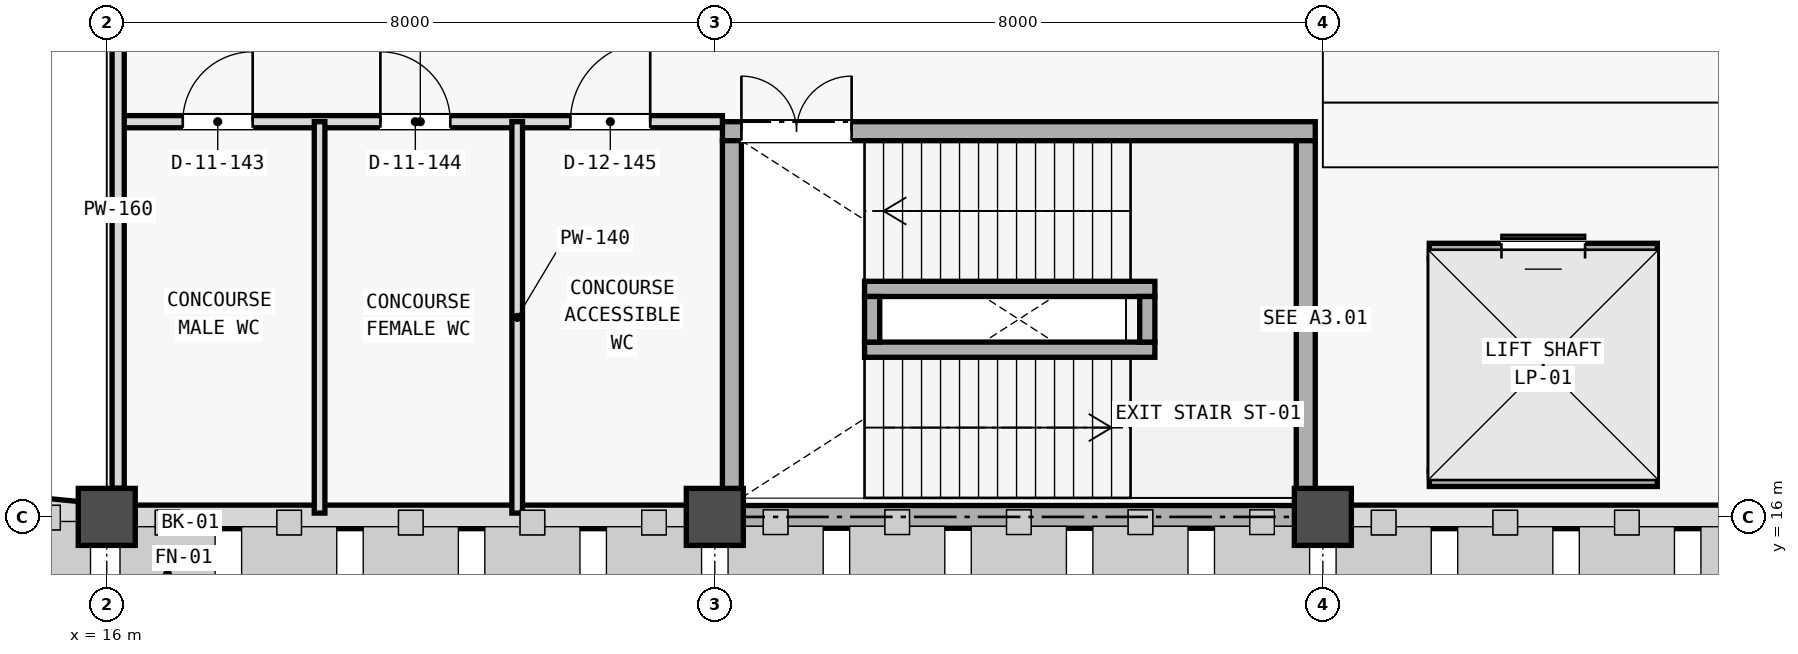
"""IFC4 building model, lengths in metres.
Left out: names, types, materials, properties, quantities, classifications, styles, units other than length and angle.
Written with IfcOpenShell. Run it as: python <this file> out.ifc"""

import sys

from ifc_helpers import new_model, si_unit, direction, frame, frame_2d, origin, origin_2d, place, context, subcontext, project, spatial, rectangle, extrude, element, fill, save


model = new_model("IFC4")
c1 = context("Model", 3, precision=1e-05, world=origin(), true_north=direction((0.0, 1.0)))
c2 = subcontext(c1, "Body", "Model", "MODEL_VIEW")
j1 = project(units=[si_unit("LENGTHUNIT", "METRE"), si_unit("PLANEANGLEUNIT", "RADIAN")], contexts=[c1])
p1 = place(None, origin())
s1 = spatial("IfcSite", under=j1, at=p1, CompositionType="ELEMENT")
p2 = place(p1, origin())
s2 = spatial("IfcBuilding", under=s1, at=p2, CompositionType="ELEMENT")
p3 = place(p2, frame((0.0, 0.0, 5.4)))
s3 = spatial("IfcBuildingStorey", under=s2, at=p3, CompositionType="ELEMENT", Elevation=5.4)
for number, where, z_axis, x_axis in (
    (1, (16.0, 16.0, 0.0), (0.0, 0.0, 1.0), (1.0, 0.0, 0.0)),
    (2, (24.0, 16.0, 0.0), (0.0, 0.0, 1.0), (1.0, 0.0, 0.0)),
    (3, (32.0, 16.0, 0.0), (0.0, 0.0, 1.0), (1.0, 0.0, 0.0)),
):
    element("IfcColumn", number, at=place(p3, frame(where, z_axis=z_axis, x_axis=x_axis)), inside=s3, PredefinedType="COLUMN", context=c2, shape_type="SweptSolid", body=[
        extrude(rectangle(XDim=0.75, YDim=0.75, at=origin_2d()), origin(), (0.0, 0.0, 1.0), 4.55),
    ])
p4 = place(p3, frame((16.371, 16.0, 0.0), z_axis=(0.0, 0.0, 1.0), x_axis=(1.0, 0.0, 0.0)))
e4 = element("IfcWall", 4, at=p4, inside=s3, PredefinedType="STANDARD", context=c2, shape_type="SweptSolid", body=[
    extrude(rectangle(XDim=7.258, YDim=0.31, at=frame_2d((3.629, 0.0))), origin(), (0.0, 0.0, 1.0), 3.73),
])
p5 = place(p3, frame((24.371, 16.0, 0.0), z_axis=(0.0, 0.0, 1.0), x_axis=(1.0, 0.0, 0.0)))
e5 = element("IfcWall", 5, at=p5, inside=s3, PredefinedType="SHEAR", context=c2, shape_type="SweptSolid", body=[
    extrude(rectangle(XDim=7.258, YDim=0.3, at=frame_2d((3.629, 0.0))), origin(), (0.0, 0.0, 1.0), 4.8),
])
p6 = place(p3, frame((32.371, 16.0, 0.0), z_axis=(0.0, 0.0, 1.0), x_axis=(1.0, 0.0, 0.0)))
e6 = element("IfcWall", 6, at=p6, inside=s3, PredefinedType="STANDARD", context=c2, shape_type="SweptSolid", body=[
    extrude(rectangle(XDim=7.258, YDim=0.31, at=frame_2d((3.629, 0.0))), origin(), (0.0, 0.0, 1.0), 3.73),
])
p7 = place(p3, frame((12.879, 16.307, 0.0), z_axis=(0.0, 0.0, 1.0), x_axis=(0.995186340733, -0.098000751113, 0.0)))
e7 = element("IfcWall", 7, at=p7, inside=s3, PredefinedType="STANDARD", context=c2, shape_type="SweptSolid", body=[
    extrude(rectangle(XDim=3.136, YDim=0.33, at=frame_2d((1.568, 0.0))), origin(), (0.0, 0.0, 1.0), 3.83),
])
p8 = place(p7, frame((0.993, 0.0, 1.05)))
e8 = element("IfcOpeningElement", 8, at=p8, cuts=e7, PredefinedType="OPENING", context=c2, shape_type="SweptSolid", body=[
    extrude(rectangle(XDim=1.15, YDim=1.7, at=frame_2d((0.575, 0.85))), frame((0.0, 0.175, 0.0), z_axis=(0.0, -1.0, 0.0), x_axis=(1.0, 0.0, 0.0)), (0.0, 0.0, 1.0), 0.35),
])
p9 = place(p3, frame((24.1, 21.075, 0.0), z_axis=(0.0, 0.0, 1.0), x_axis=(1.0, 0.0, 0.0)))
e9 = element("IfcWall", 9, at=p9, inside=s3, PredefinedType="SHEAR", context=c2, shape_type="SweptSolid", body=[
    extrude(rectangle(XDim=7.8, YDim=0.25, at=frame_2d((3.9, 0.0))), origin(), (0.0, 0.0, 1.0), 4.8),
])
p10 = place(p9, frame((0.25, 0.0, 0.0)))
e10 = element("IfcOpeningElement", 10, at=p10, cuts=e9, PredefinedType="OPENING", context=c2, shape_type="SweptSolid", body=[
    extrude(rectangle(XDim=1.45, YDim=2.2, at=frame_2d((0.725, 1.1))), frame((0.0, 0.135, 0.0), z_axis=(0.0, -1.0, 0.0), x_axis=(1.0, 0.0, 0.0)), (0.0, 0.0, 1.0), 0.27),
])
for number, where, z_axis, x_axis in (
    (11, (24.225, 16.25, 0.0), (0.0, 0.0, 1.0), (0.0, 1.0, 0.0)),
    (12, (31.775, 16.25, 0.0), (0.0, 0.0, 1.0), (0.0, 1.0, 0.0)),
):
    element("IfcWall", number, at=place(p3, frame(where, z_axis=z_axis, x_axis=x_axis)), inside=s3, PredefinedType="SHEAR", context=c2, shape_type="SweptSolid", body=[
        extrude(rectangle(XDim=4.7, YDim=0.25, at=frame_2d((2.35, 0.0))), origin(), (0.0, 0.0, 1.0), 4.8),
    ])
for number, where, z_axis, x_axis in (
    (13, (25.97, 18.2, 0.0), (0.0, 0.0, 1.0), (1.0, 0.0, 0.0)),
    (14, (25.97, 19.0, 0.0), (0.0, 0.0, 1.0), (1.0, 0.0, 0.0)),
):
    element("IfcWall", number, at=place(p3, frame(where, z_axis=z_axis, x_axis=x_axis)), inside=s3, PredefinedType="SHEAR", context=c2, shape_type="SweptSolid", body=[
        extrude(rectangle(XDim=3.82, YDim=0.2, at=frame_2d((1.91, 0.0))), origin(), (0.0, 0.0, 1.0), 4.8),
    ])
for number, where, z_axis, x_axis in (
    (15, (26.07, 18.3, 0.0), (0.0, 0.0, 1.0), (0.0, 1.0, 0.0)),
    (16, (29.69, 18.3, 0.0), (0.0, 0.0, 1.0), (0.0, 1.0, 0.0)),
):
    element("IfcWall", number, at=place(p3, frame(where, z_axis=z_axis, x_axis=x_axis)), inside=s3, PredefinedType="SHEAR", context=c2, shape_type="SweptSolid", body=[
        extrude(rectangle(XDim=0.6, YDim=0.2, at=frame_2d((0.3, 0.0))), origin(), (0.0, 0.0, 1.0), 4.8),
    ])
p11 = place(p3, frame((33.4, 16.5, 0.0), z_axis=(0.0, 0.0, 1.0), x_axis=(1.0, 0.0, 0.0)))
e17 = element("IfcWall", 17, at=p11, inside=s3, PredefinedType="SHEAR", context=c2, shape_type="SweptSolid", body=[
    extrude(rectangle(XDim=3.0, YDim=0.2, at=frame_2d((1.5, 0.0))), origin(), (0.0, 0.0, 1.0), 4.8),
])
p12 = place(p3, frame((33.4, 19.5, 0.0), z_axis=(0.0, 0.0, 1.0), x_axis=(1.0, 0.0, 0.0)))
e18 = element("IfcWall", 18, at=p12, inside=s3, PredefinedType="SHEAR", context=c2, shape_type="SweptSolid", body=[
    extrude(rectangle(XDim=3.0, YDim=0.2, at=frame_2d((1.5, 0.0))), origin(), (0.0, 0.0, 1.0), 4.8),
])
p13 = place(p12, frame((0.95, 0.0, 0.0)))
e19 = element("IfcOpeningElement", 19, at=p13, cuts=e18, PredefinedType="OPENING", context=c2, shape_type="SweptSolid", body=[
    extrude(rectangle(XDim=1.1, YDim=2.2, at=frame_2d((0.55, 1.1))), frame((0.0, 0.11, 0.0), z_axis=(0.0, -1.0, 0.0), x_axis=(1.0, 0.0, 0.0)), (0.0, 0.0, 1.0), 0.22),
])
for number, where, z_axis, x_axis in (
    (20, (33.5, 16.6, 0.0), (0.0, 0.0, 1.0), (0.0, 1.0, 0.0)),
    (21, (36.3, 16.6, 0.0), (0.0, 0.0, 1.0), (0.0, 1.0, 0.0)),
):
    element("IfcWall", number, at=place(p3, frame(where, z_axis=z_axis, x_axis=x_axis)), inside=s3, PredefinedType="SHEAR", context=c2, shape_type="SweptSolid", body=[
        extrude(rectangle(XDim=2.8, YDim=0.2, at=frame_2d((1.4, 0.0))), origin(), (0.0, 0.0, 1.0), 4.8),
    ])
p14 = place(p3, frame((16.15, 21.2, 0.0), z_axis=(0.0, 0.0, 1.0), x_axis=(1.0, 0.0, 0.0)))
e22 = element("IfcWall", 22, at=p14, inside=s3, PredefinedType="PARTITIONING", context=c2, shape_type="SweptSolid", body=[
    extrude(rectangle(XDim=7.95, YDim=0.16, at=frame_2d((3.975, 0.0))), origin(), (0.0, 0.0, 1.0), 3.83),
])
p15 = place(p14, frame((0.85, 0.0, 0.0)))
e23 = element("IfcOpeningElement", 23, at=p15, cuts=e22, PredefinedType="OPENING", context=c2, shape_type="SweptSolid", body=[
    extrude(rectangle(XDim=0.92, YDim=2.1, at=frame_2d((0.46, 1.05))), frame((0.0, 0.09, 0.0), z_axis=(0.0, -1.0, 0.0), x_axis=(1.0, 0.0, 0.0)), (0.0, 0.0, 1.0), 0.18),
])
p16 = place(p14, frame((3.45, 0.0, 0.0)))
e24 = element("IfcOpeningElement", 24, at=p16, cuts=e22, PredefinedType="OPENING", context=c2, shape_type="SweptSolid", body=[
    extrude(rectangle(XDim=0.92, YDim=2.1, at=frame_2d((0.46, 1.05))), frame((0.0, 0.09, 0.0), z_axis=(0.0, -1.0, 0.0), x_axis=(1.0, 0.0, 0.0)), (0.0, 0.0, 1.0), 0.18),
])
p17 = place(p14, frame((5.95, 0.0, 0.0)))
e25 = element("IfcOpeningElement", 25, at=p17, cuts=e22, PredefinedType="OPENING", context=c2, shape_type="SweptSolid", body=[
    extrude(rectangle(XDim=1.05, YDim=2.15, at=frame_2d((0.525, 1.075))), frame((0.0, 0.09, 0.0), z_axis=(0.0, -1.0, 0.0), x_axis=(1.0, 0.0, 0.0)), (0.0, 0.0, 1.0), 0.18),
])
p18 = place(p3, frame((16.15, 16.377, 0.0), z_axis=(0.0, 0.0, 1.0), x_axis=(0.0, 1.0, 0.0)))
e26 = element("IfcWall", 26, at=p18, inside=s3, PredefinedType="PARTITIONING", context=c2, shape_type="SweptSolid", body=[
    extrude(rectangle(XDim=7.321, YDim=0.16, at=frame_2d((3.661, 0.0))), origin(), (0.0, 0.0, 1.0), 3.83),
])
for number, where, z_axis, x_axis in (
    (27, (18.8, 16.05, 0.0), (0.0, 0.0, 1.0), (0.0, 1.0, 0.0)),
    (28, (21.4, 16.05, 0.0), (0.0, 0.0, 1.0), (0.0, 1.0, 0.0)),
):
    element("IfcWall", number, at=place(p3, frame(where, z_axis=z_axis, x_axis=x_axis)), inside=s3, PredefinedType="PLUMBINGWALL", context=c2, shape_type="SweptSolid", body=[
        extrude(rectangle(XDim=5.15, YDim=0.14, at=frame_2d((2.575, 0.0))), origin(), (0.0, 0.0, 1.0), 3.73),
    ])
p19 = place(p10, origin())
e29 = element("IfcDoor", 29, at=p19, inside=s3, OperationType="DOUBLE_DOOR_SINGLE_SWING", PredefinedType="DOOR", context=c2, shape_type="SweptSolid", body=[
    extrude(rectangle(XDim=1.45, YDim=2.2, at=frame_2d((0.725, 1.1))), frame((0.0, 0.025, 0.0), z_axis=(0.0, -1.0, 0.0), x_axis=(1.0, 0.0, 0.0)), (0.0, 0.0, 1.0), 0.05),
])
fill(e10, e29)
p20 = place(p13, origin())
e30 = element("IfcDoor", 30, at=p20, inside=s3, OperationType="SLIDING_TO_LEFT", PredefinedType="DOOR", context=c2, shape_type="SweptSolid", body=[
    extrude(rectangle(XDim=1.1, YDim=2.2, at=frame_2d((0.55, 1.1))), frame((0.0, 0.025, 0.0), z_axis=(0.0, -1.0, 0.0), x_axis=(1.0, 0.0, 0.0)), (0.0, 0.0, 1.0), 0.05),
])
fill(e19, e30)
p21 = place(p15, origin())
e31 = element("IfcDoor", 31, at=p21, inside=s3, OperationType="SINGLE_SWING_RIGHT", PredefinedType="DOOR", context=c2, shape_type="SweptSolid", body=[
    extrude(rectangle(XDim=0.92, YDim=2.1, at=frame_2d((0.46, 1.05))), frame((0.0, 0.025, 0.0), z_axis=(0.0, -1.0, 0.0), x_axis=(1.0, 0.0, 0.0)), (0.0, 0.0, 1.0), 0.05),
])
fill(e23, e31)
p22 = place(p16, origin())
e32 = element("IfcDoor", 32, at=p22, inside=s3, OperationType="SINGLE_SWING_LEFT", PredefinedType="DOOR", context=c2, shape_type="SweptSolid", body=[
    extrude(rectangle(XDim=0.92, YDim=2.1, at=frame_2d((0.46, 1.05))), frame((0.0, 0.025, 0.0), z_axis=(0.0, -1.0, 0.0), x_axis=(1.0, 0.0, 0.0)), (0.0, 0.0, 1.0), 0.05),
])
fill(e24, e32)
p23 = place(p17, origin())
e33 = element("IfcDoor", 33, at=p23, inside=s3, OperationType="SINGLE_SWING_RIGHT", PredefinedType="DOOR", context=c2, shape_type="SweptSolid", body=[
    extrude(rectangle(XDim=1.05, YDim=2.15, at=frame_2d((0.525, 1.075))), frame((0.0, 0.025, 0.0), z_axis=(0.0, -1.0, 0.0), x_axis=(1.0, 0.0, 0.0)), (0.0, 0.0, 1.0), 0.05),
])
fill(e25, e33)
save(model, sys.argv[1])
